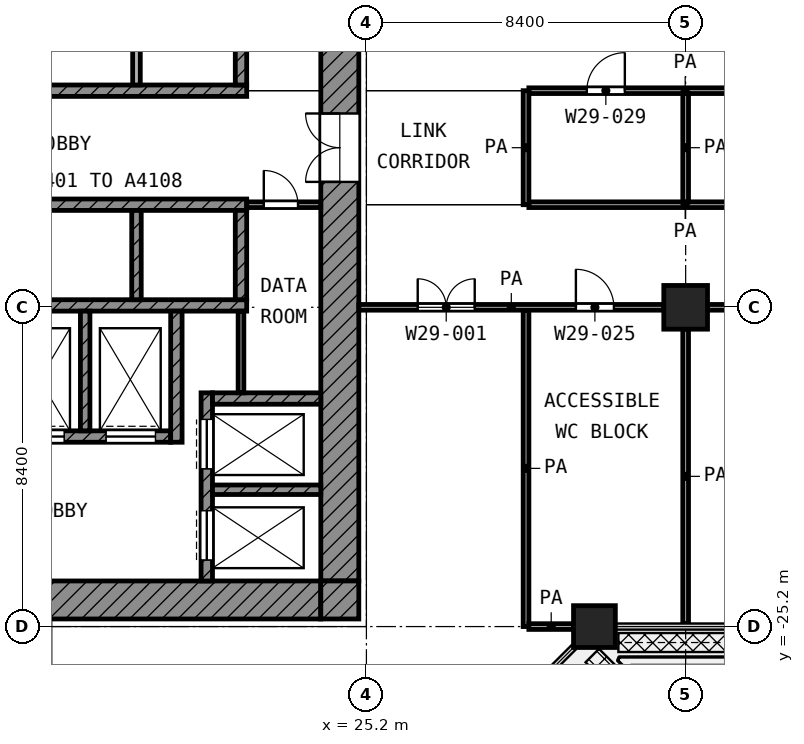
"""IFC4 building model, lengths in metres.
Left out: names, types, materials, properties, quantities, classifications, styles, units other than length and angle.
Written with IfcOpenShell. Run it as: python <this file> out.ifc"""

import sys

from ifc_helpers import new_model, si_unit, direction, frame, frame_2d, origin, origin_2d, place, context, subcontext, project, spatial, rectangle, extrude, element, fill, save


model = new_model("IFC4")
c1 = context("Model", 3, precision=1e-05, world=origin(), true_north=direction((0.0, 1.0)))
c2 = subcontext(c1, "Body", "Model", "MODEL_VIEW")
j1 = project(units=[si_unit("LENGTHUNIT", "METRE"), si_unit("PLANEANGLEUNIT", "RADIAN")], contexts=[c1])
p1 = place(None, origin())
s1 = spatial("IfcSite", under=j1, at=p1, CompositionType="ELEMENT")
p2 = place(p1, origin())
s2 = spatial("IfcBuilding", under=s1, at=p2, CompositionType="ELEMENT")
p3 = place(p2, frame((0.0, 0.0, 149.2)))
s3 = spatial("IfcBuildingStorey", under=s2, at=p3, CompositionType="ELEMENT", Elevation=149.2)
p4 = place(p3, frame((33.6, -16.8, 0.0), z_axis=(0.0, 0.0, 1.0), x_axis=(1.0, 0.0, 0.0)))
e1 = element("IfcColumn", 1, at=p4, inside=s3, PredefinedType="COLUMN", context=c2, shape_type="SweptSolid", body=[
    extrude(rectangle(XDim=1.15, YDim=1.15, at=origin_2d()), origin(), (0.0, 0.0, 1.0), 4.2),
])
p5 = place(p3, frame((31.2, -25.2, 0.0), z_axis=(0.0, 0.0, 1.0), x_axis=(1.0, 0.0, 0.0)))
e2 = element("IfcColumn", 2, at=p5, inside=s3, PredefinedType="COLUMN", context=c2, shape_type="SweptSolid", body=[
    extrude(rectangle(XDim=1.1, YDim=1.1, at=origin_2d()), origin(), (0.0, 0.0, 1.0), 4.2),
])
p6 = place(p3, frame((24.5, -24.0, 0.0), z_axis=(0.0, 0.0, 1.0), x_axis=(0.0, 1.0, 0.0)))
e3 = element("IfcWall", 3, at=p6, inside=s3, PredefinedType="SHEAR", context=c2, shape_type="SweptSolid", body=[
    extrude(rectangle(XDim=18.6, YDim=1.0, at=frame_2d((9.3, 0.0))), origin(), (0.0, 0.0, 1.0), 3.7),
])
p7 = place(p6, frame((10.5, 0.0, 0.0)))
e4 = element("IfcOpeningElement", 4, at=p7, cuts=e3, PredefinedType="OPENING", context=c2, shape_type="SweptSolid", body=[
    extrude(rectangle(XDim=1.8, YDim=2.1, at=frame_2d((0.9, 1.05))), frame((0.0, 0.51, 0.0), z_axis=(0.0, -1.0, 0.0), x_axis=(1.0, 0.0, 0.0)), (0.0, 0.0, 1.0), 1.02),
])
p8 = place(p3, frame((5.4, -24.5, 0.0), z_axis=(0.0, 0.0, 1.0), x_axis=(1.0, 0.0, 0.0)))
e5 = element("IfcWall", 5, at=p8, inside=s3, PredefinedType="SHEAR", context=c2, shape_type="SweptSolid", body=[
    extrude(rectangle(XDim=18.6, YDim=1.0, at=frame_2d((9.3, 0.0))), origin(), (0.0, 0.0, 1.0), 3.7),
])
p9 = place(p8, frame((6.3, 0.0, 0.0)))
e6 = element("IfcOpeningElement", 6, at=p9, cuts=e5, PredefinedType="OPENING", context=c2, shape_type="SweptSolid", body=[
    extrude(rectangle(XDim=1.8, YDim=2.1, at=frame_2d((0.9, 1.05))), frame((0.0, 0.51, 0.0), z_axis=(0.0, -1.0, 0.0), x_axis=(1.0, 0.0, 0.0)), (0.0, 0.0, 1.0), 1.02),
])
p10 = place(p3, frame((24.5, -25.0, 0.0), z_axis=(0.0, 0.0, 1.0), x_axis=(0.0, 1.0, 0.0)))
e7 = element("IfcWall", 7, at=p10, inside=s3, PredefinedType="SHEAR", context=c2, shape_type="SweptSolid", body=[
    extrude(rectangle(XDim=1.0, YDim=1.0, at=frame_2d((0.5, 0.0))), origin(), (0.0, 0.0, 1.0), 3.7),
])
p11 = place(p3, frame((5.4, -11.1, 0.0), z_axis=(0.0, 0.0, 1.0), x_axis=(1.0, 0.0, 0.0)))
e8 = element("IfcWall", 8, at=p11, inside=s3, PredefinedType="SHEAR", context=c2, shape_type="SweptSolid", body=[
    extrude(rectangle(XDim=16.65, YDim=0.3, at=frame_2d((8.325, 0.0))), origin(), (0.0, 0.0, 1.0), 3.7),
])
p12 = place(p11, frame((0.825, 0.0, 0.0)))
e9 = element("IfcOpeningElement", 9, at=p12, cuts=e8, PredefinedType="OPENING", context=c2, shape_type="SweptSolid", body=[
    extrude(rectangle(XDim=1.1, YDim=2.1, at=frame_2d((0.55, 1.05))), frame((0.0, 0.16, 0.0), z_axis=(0.0, -1.0, 0.0), x_axis=(1.0, 0.0, 0.0)), (0.0, 0.0, 1.0), 0.32),
])
p13 = place(p11, frame((3.575, 0.0, 0.0)))
e10 = element("IfcOpeningElement", 10, at=p13, cuts=e8, PredefinedType="OPENING", context=c2, shape_type="SweptSolid", body=[
    extrude(rectangle(XDim=1.1, YDim=2.1, at=frame_2d((0.55, 1.05))), frame((0.0, 0.16, 0.0), z_axis=(0.0, -1.0, 0.0), x_axis=(1.0, 0.0, 0.0)), (0.0, 0.0, 1.0), 0.32),
])
p14 = place(p11, frame((6.325, 0.0, 0.0)))
e11 = element("IfcOpeningElement", 11, at=p14, cuts=e8, PredefinedType="OPENING", context=c2, shape_type="SweptSolid", body=[
    extrude(rectangle(XDim=1.1, YDim=2.1, at=frame_2d((0.55, 1.05))), frame((0.0, 0.16, 0.0), z_axis=(0.0, -1.0, 0.0), x_axis=(1.0, 0.0, 0.0)), (0.0, 0.0, 1.0), 0.32),
])
p15 = place(p11, frame((9.075, 0.0, 0.0)))
e12 = element("IfcOpeningElement", 12, at=p15, cuts=e8, PredefinedType="OPENING", context=c2, shape_type="SweptSolid", body=[
    extrude(rectangle(XDim=1.1, YDim=2.1, at=frame_2d((0.55, 1.05))), frame((0.0, 0.16, 0.0), z_axis=(0.0, -1.0, 0.0), x_axis=(1.0, 0.0, 0.0)), (0.0, 0.0, 1.0), 0.32),
])
for number, where, z_axis, x_axis in (
    (13, (5.4, -14.1, 0.0), (0.0, 0.0, 1.0), (1.0, 0.0, 0.0)),
    (14, (5.4, -16.75, 0.0), (0.0, 0.0, 1.0), (1.0, 0.0, 0.0)),
):
    element("IfcWall", number, at=place(p3, frame(where, z_axis=z_axis, x_axis=x_axis)), inside=s3, PredefinedType="SHEAR", context=c2, shape_type="SweptSolid", body=[
        extrude(rectangle(XDim=16.65, YDim=0.3, at=frame_2d((8.325, 0.0))), origin(), (0.0, 0.0, 1.0), 3.7),
    ])
p16 = place(p3, frame((5.4, -20.2, 0.0), z_axis=(0.0, 0.0, 1.0), x_axis=(1.0, 0.0, 0.0)))
e15 = element("IfcWall", 15, at=p16, inside=s3, PredefinedType="SHEAR", context=c2, shape_type="SweptSolid", body=[
    extrude(rectangle(XDim=14.65, YDim=0.3, at=frame_2d((7.325, 0.0))), origin(), (0.0, 0.0, 1.0), 3.7),
])
p17 = place(p16, frame((10.55, 0.0, 0.0)))
e16 = element("IfcOpeningElement", 16, at=p17, cuts=e15, PredefinedType="OPENING", context=c2, shape_type="SweptSolid", body=[
    extrude(rectangle(XDim=1.3, YDim=2.1, at=frame_2d((0.65, 1.05))), frame((0.0, 0.16, 0.0), z_axis=(0.0, -1.0, 0.0), x_axis=(1.0, 0.0, 0.0)), (0.0, 0.0, 1.0), 0.32),
])
p18 = place(p16, frame((12.95, 0.0, 0.0)))
e17 = element("IfcOpeningElement", 17, at=p18, cuts=e15, PredefinedType="OPENING", context=c2, shape_type="SweptSolid", body=[
    extrude(rectangle(XDim=1.3, YDim=2.1, at=frame_2d((0.65, 1.05))), frame((0.0, 0.16, 0.0), z_axis=(0.0, -1.0, 0.0), x_axis=(1.0, 0.0, 0.0)), (0.0, 0.0, 1.0), 0.32),
])
p19 = place(p16, frame((0.55, 0.0, 0.0)))
e18 = element("IfcOpeningElement", 18, at=p19, cuts=e15, PredefinedType="OPENING", context=c2, shape_type="SweptSolid", body=[
    extrude(rectangle(XDim=1.3, YDim=2.1, at=frame_2d((0.65, 1.05))), frame((0.0, 0.16, 0.0), z_axis=(0.0, -1.0, 0.0), x_axis=(1.0, 0.0, 0.0)), (0.0, 0.0, 1.0), 0.32),
])
p20 = place(p16, frame((2.95, 0.0, 0.0)))
e19 = element("IfcOpeningElement", 19, at=p20, cuts=e15, PredefinedType="OPENING", context=c2, shape_type="SweptSolid", body=[
    extrude(rectangle(XDim=1.3, YDim=2.1, at=frame_2d((0.65, 1.05))), frame((0.0, 0.16, 0.0), z_axis=(0.0, -1.0, 0.0), x_axis=(1.0, 0.0, 0.0)), (0.0, 0.0, 1.0), 0.32),
])
p21 = place(p16, frame((5.35, 0.0, 0.0)))
e20 = element("IfcOpeningElement", 20, at=p21, cuts=e15, PredefinedType="OPENING", context=c2, shape_type="SweptSolid", body=[
    extrude(rectangle(XDim=0.9, YDim=2.1, at=frame_2d((0.45, 1.05))), frame((0.0, 0.16, 0.0), z_axis=(0.0, -1.0, 0.0), x_axis=(1.0, 0.0, 0.0)), (0.0, 0.0, 1.0), 0.32),
])
p22 = place(p16, frame((7.75, 0.0, 0.0)))
e21 = element("IfcOpeningElement", 21, at=p22, cuts=e15, PredefinedType="OPENING", context=c2, shape_type="SweptSolid", body=[
    extrude(rectangle(XDim=0.9, YDim=2.1, at=frame_2d((0.45, 1.05))), frame((0.0, 0.16, 0.0), z_axis=(0.0, -1.0, 0.0), x_axis=(1.0, 0.0, 0.0)), (0.0, 0.0, 1.0), 0.32),
])
p23 = place(p3, frame((20.2, -20.35, 0.0), z_axis=(0.0, 0.0, 1.0), x_axis=(0.0, 1.0, 0.0)))
e22 = element("IfcWall", 22, at=p23, inside=s3, PredefinedType="SHEAR", context=c2, shape_type="SweptSolid", body=[
    extrude(rectangle(XDim=3.45, YDim=0.3, at=frame_2d((1.725, 0.0))), origin(), (0.0, 0.0, 1.0), 3.7),
])
p24 = place(p3, frame((21.9, -10.95, 0.0), z_axis=(0.0, 0.0, 1.0), x_axis=(0.0, 1.0, 0.0)))
e23 = element("IfcWall", 23, at=p24, inside=s3, PredefinedType="SHEAR", context=c2, shape_type="SweptSolid", body=[
    extrude(rectangle(XDim=2.35, YDim=0.3, at=frame_2d((1.175, 0.0))), origin(), (0.0, 0.0, 1.0), 3.7),
])
p25 = place(p3, frame((21.9, -16.6, 0.0), z_axis=(0.0, 0.0, 1.0), x_axis=(0.0, 1.0, 0.0)))
e24 = element("IfcWall", 24, at=p25, inside=s3, PredefinedType="SHEAR", context=c2, shape_type="SweptSolid", body=[
    extrude(rectangle(XDim=2.35, YDim=0.3, at=frame_2d((1.175, 0.0))), origin(), (0.0, 0.0, 1.0), 3.7),
])
p26 = place(p3, frame((21.15, -19.2, 0.0), z_axis=(0.0, 0.0, 1.0), x_axis=(1.0, 0.0, 0.0)))
e25 = element("IfcWall", 25, at=p26, inside=s3, PredefinedType="SHEAR", context=c2, shape_type="SweptSolid", body=[
    extrude(rectangle(XDim=2.85, YDim=0.3, at=frame_2d((1.425, 0.0))), origin(), (0.0, 0.0, 1.0), 3.7),
])
p27 = place(p3, frame((21.0, -24.0, 0.0), z_axis=(0.0, 0.0, 1.0), x_axis=(0.0, 1.0, 0.0)))
e26 = element("IfcWall", 26, at=p27, inside=s3, PredefinedType="SHEAR", context=c2, shape_type="SweptSolid", body=[
    extrude(rectangle(XDim=4.95, YDim=0.3, at=frame_2d((2.475, 0.0))), origin(), (0.0, 0.0, 1.0), 3.7),
])
p28 = place(p27, frame((2.95, 0.0, 0.0)))
e27 = element("IfcOpeningElement", 27, at=p28, cuts=e26, PredefinedType="OPENING", context=c2, shape_type="SweptSolid", body=[
    extrude(rectangle(XDim=1.3, YDim=2.1, at=frame_2d((0.65, 1.05))), frame((0.0, 0.16, 0.0), z_axis=(0.0, -1.0, 0.0), x_axis=(1.0, 0.0, 0.0)), (0.0, 0.0, 1.0), 0.32),
])
p29 = place(p27, frame((0.55, 0.0, 0.0)))
e28 = element("IfcOpeningElement", 28, at=p29, cuts=e26, PredefinedType="OPENING", context=c2, shape_type="SweptSolid", body=[
    extrude(rectangle(XDim=1.3, YDim=2.1, at=frame_2d((0.65, 1.05))), frame((0.0, 0.16, 0.0), z_axis=(0.0, -1.0, 0.0), x_axis=(1.0, 0.0, 0.0)), (0.0, 0.0, 1.0), 0.32),
])
p30 = place(p3, frame((21.15, -21.6, 0.0), z_axis=(0.0, 0.0, 1.0), x_axis=(1.0, 0.0, 0.0)))
e29 = element("IfcWall", 29, at=p30, inside=s3, PredefinedType="SHEAR", context=c2, shape_type="SweptSolid", body=[
    extrude(rectangle(XDim=2.85, YDim=0.25, at=frame_2d((1.425, 0.0))), origin(), (0.0, 0.0, 1.0), 3.7),
])
p31 = place(p3, frame((17.8, -20.05, 0.0), z_axis=(0.0, 0.0, 1.0), x_axis=(0.0, 1.0, 0.0)))
e30 = element("IfcWall", 30, at=p31, inside=s3, PredefinedType="SHEAR", context=c2, shape_type="SweptSolid", body=[
    extrude(rectangle(XDim=3.15, YDim=0.25, at=frame_2d((1.575, 0.0))), origin(), (0.0, 0.0, 1.0), 3.7),
])
p32 = place(p3, frame((19.15, -10.95, 0.0), z_axis=(0.0, 0.0, 1.0), x_axis=(0.0, 1.0, 0.0)))
e31 = element("IfcWall", 31, at=p32, inside=s3, PredefinedType="PARTITIONING", context=c2, shape_type="SweptSolid", body=[
    extrude(rectangle(XDim=2.35, YDim=0.2, at=frame_2d((1.175, 0.0))), origin(), (0.0, 0.0, 1.0), 3.7),
])
p33 = place(p3, frame((19.15, -16.6, 0.0), z_axis=(0.0, 0.0, 1.0), x_axis=(0.0, 1.0, 0.0)))
e32 = element("IfcWall", 32, at=p33, inside=s3, PredefinedType="SHEAR", context=c2, shape_type="SweptSolid", body=[
    extrude(rectangle(XDim=2.35, YDim=0.25, at=frame_2d((1.175, 0.0))), origin(), (0.0, 0.0, 1.0), 3.7),
])
p34 = place(p3, frame((21.9, -19.05, 0.0), z_axis=(0.0, 0.0, 1.0), x_axis=(0.0, 1.0, 0.0)))
e33 = element("IfcWall", 33, at=p34, inside=s3, PredefinedType="PARTITIONING", context=c2, shape_type="SweptSolid", body=[
    extrude(rectangle(XDim=2.15, YDim=0.15, at=frame_2d((1.075, 0.0))), origin(), (0.0, 0.0, 1.0), 3.7),
])
p35 = place(p3, frame((22.05, -14.1, 0.0), z_axis=(0.0, 0.0, 1.0), x_axis=(1.0, 0.0, 0.0)))
e34 = element("IfcWall", 34, at=p35, inside=s3, PredefinedType="PARTITIONING", context=c2, shape_type="SweptSolid", body=[
    extrude(rectangle(XDim=1.95, YDim=0.15, at=frame_2d((0.975, 0.0))), origin(), (0.0, 0.0, 1.0), 3.7),
])
p36 = place(p35, frame((0.45, 0.0, 0.0)))
e35 = element("IfcOpeningElement", 35, at=p36, cuts=e34, PredefinedType="OPENING", context=c2, shape_type="SweptSolid", body=[
    extrude(rectangle(XDim=0.9, YDim=2.1, at=frame_2d((0.45, 1.05))), frame((0.0, 0.085, 0.0), z_axis=(0.0, -1.0, 0.0), x_axis=(1.0, 0.0, 0.0)), (0.0, 0.0, 1.0), 0.17),
])
p37 = place(p3, frame((29.475, -25.2, 0.0), z_axis=(0.0, 0.0, 1.0), x_axis=(1.0, 0.0, 0.0)))
e36 = element("IfcWall", 36, at=p37, inside=s3, PredefinedType="PARTITIONING", context=c2, shape_type="SweptSolid", body=[
    extrude(rectangle(XDim=1.175, YDim=0.15, at=frame_2d((0.587, 0.0))), origin(), (0.0, 0.0, 1.0), 3.7),
])
p38 = place(p3, frame((25.0, -16.8, 0.0), z_axis=(0.0, 0.0, 1.0), x_axis=(1.0, 0.0, 0.0)))
e37 = element("IfcWall", 37, at=p38, inside=s3, PredefinedType="PARTITIONING", context=c2, shape_type="SweptSolid", body=[
    extrude(rectangle(XDim=8.025, YDim=0.15, at=frame_2d((4.012, 0.0))), origin(), (0.0, 0.0, 1.0), 3.7),
])
p39 = place(p38, frame((1.55, 0.0, 0.0)))
e38 = element("IfcOpeningElement", 38, at=p39, cuts=e37, PredefinedType="OPENING", context=c2, shape_type="SweptSolid", body=[
    extrude(rectangle(XDim=1.5, YDim=2.1, at=frame_2d((0.75, 1.05))), frame((0.0, 0.085, 0.0), z_axis=(0.0, -1.0, 0.0), x_axis=(1.0, 0.0, 0.0)), (0.0, 0.0, 1.0), 0.17),
])
p40 = place(p38, frame((5.712, 0.0, 0.0)))
e39 = element("IfcOpeningElement", 39, at=p40, cuts=e37, PredefinedType="OPENING", context=c2, shape_type="SweptSolid", body=[
    extrude(rectangle(XDim=1.0, YDim=2.1, at=frame_2d((0.5, 1.05))), frame((0.0, 0.085, 0.0), z_axis=(0.0, -1.0, 0.0), x_axis=(1.0, 0.0, 0.0)), (0.0, 0.0, 1.0), 0.17),
])
p41 = place(p3, frame((34.175, -16.8, 0.0), z_axis=(0.0, 0.0, 1.0), x_axis=(1.0, 0.0, 0.0)))
e40 = element("IfcWall", 40, at=p41, inside=s3, PredefinedType="PARTITIONING", context=c2, shape_type="SweptSolid", body=[
    extrude(rectangle(XDim=41.345, YDim=0.15, at=frame_2d((20.672, 0.0))), origin(), (0.0, 0.0, 1.0), 3.7),
])
p42 = place(p41, frame((3.312, 0.0, 0.0)))
e41 = element("IfcOpeningElement", 41, at=p42, cuts=e40, PredefinedType="OPENING", context=c2, shape_type="SweptSolid", body=[
    extrude(rectangle(XDim=1.2, YDim=2.1, at=frame_2d((0.6, 1.05))), frame((0.0, 0.085, 0.0), z_axis=(0.0, -1.0, 0.0), x_axis=(1.0, 0.0, 0.0)), (0.0, 0.0, 1.0), 0.17),
])
p43 = place(p41, frame((8.825, 0.0, 0.0)))
e42 = element("IfcOpeningElement", 42, at=p43, cuts=e40, PredefinedType="OPENING", context=c2, shape_type="SweptSolid", body=[
    extrude(rectangle(XDim=1.2, YDim=2.1, at=frame_2d((0.6, 1.05))), frame((0.0, 0.085, 0.0), z_axis=(0.0, -1.0, 0.0), x_axis=(1.0, 0.0, 0.0)), (0.0, 0.0, 1.0), 0.17),
])
p44 = place(p41, frame((17.725, 0.0, 0.0)))
e43 = element("IfcOpeningElement", 43, at=p44, cuts=e40, PredefinedType="OPENING", context=c2, shape_type="SweptSolid", body=[
    extrude(rectangle(XDim=1.5, YDim=2.1, at=frame_2d((0.75, 1.05))), frame((0.0, 0.085, 0.0), z_axis=(0.0, -1.0, 0.0), x_axis=(1.0, 0.0, 0.0)), (0.0, 0.0, 1.0), 0.17),
])
p45 = place(p41, frame((25.325, 0.0, 0.0)))
e44 = element("IfcOpeningElement", 44, at=p45, cuts=e40, PredefinedType="OPENING", context=c2, shape_type="SweptSolid", body=[
    extrude(rectangle(XDim=1.2, YDim=2.1, at=frame_2d((0.6, 1.05))), frame((0.0, 0.085, 0.0), z_axis=(0.0, -1.0, 0.0), x_axis=(1.0, 0.0, 0.0)), (0.0, 0.0, 1.0), 0.17),
])
p46 = place(p41, frame((31.225, 0.0, 0.0)))
e45 = element("IfcOpeningElement", 45, at=p46, cuts=e40, PredefinedType="OPENING", context=c2, shape_type="SweptSolid", body=[
    extrude(rectangle(XDim=1.2, YDim=2.1, at=frame_2d((0.6, 1.05))), frame((0.0, 0.085, 0.0), z_axis=(0.0, -1.0, 0.0), x_axis=(1.0, 0.0, 0.0)), (0.0, 0.0, 1.0), 0.17),
])
p47 = place(p41, frame((36.475, 0.0, 0.0)))
e46 = element("IfcOpeningElement", 46, at=p47, cuts=e40, PredefinedType="OPENING", context=c2, shape_type="SweptSolid", body=[
    extrude(rectangle(XDim=1.5, YDim=2.1, at=frame_2d((0.75, 1.05))), frame((0.0, 0.085, 0.0), z_axis=(0.0, -1.0, 0.0), x_axis=(1.0, 0.0, 0.0)), (0.0, 0.0, 1.0), 0.17),
])
p48 = place(p3, frame((29.475, -14.1, 0.0), z_axis=(0.0, 0.0, 1.0), x_axis=(1.0, 0.0, 0.0)))
e47 = element("IfcWall", 47, at=p48, inside=s3, PredefinedType="PARTITIONING", context=c2, shape_type="SweptSolid", body=[
    extrude(rectangle(XDim=8.225, YDim=0.15, at=frame_2d((4.112, 0.0))), origin(), (0.0, 0.0, 1.0), 3.7),
])
p49 = place(p48, frame((5.725, 0.0, 0.0)))
e48 = element("IfcOpeningElement", 48, at=p49, cuts=e47, PredefinedType="OPENING", context=c2, shape_type="SweptSolid", body=[
    extrude(rectangle(XDim=1.0, YDim=2.1, at=frame_2d((0.5, 1.05))), frame((0.0, 0.085, 0.0), z_axis=(0.0, -1.0, 0.0), x_axis=(1.0, 0.0, 0.0)), (0.0, 0.0, 1.0), 0.17),
])
p50 = place(p3, frame((29.475, -11.1, 0.0), z_axis=(0.0, 0.0, 1.0), x_axis=(1.0, 0.0, 0.0)))
e49 = element("IfcWall", 49, at=p50, inside=s3, PredefinedType="PARTITIONING", context=c2, shape_type="SweptSolid", body=[
    extrude(rectangle(XDim=8.225, YDim=0.15, at=frame_2d((4.112, 0.0))), origin(), (0.0, 0.0, 1.0), 3.7),
])
p51 = place(p50, frame((1.525, 0.0, 0.0)))
e50 = element("IfcOpeningElement", 50, at=p51, cuts=e49, PredefinedType="OPENING", context=c2, shape_type="SweptSolid", body=[
    extrude(rectangle(XDim=1.0, YDim=2.1, at=frame_2d((0.5, 1.05))), frame((0.0, 0.085, 0.0), z_axis=(0.0, -1.0, 0.0), x_axis=(1.0, 0.0, 0.0)), (0.0, 0.0, 1.0), 0.17),
])
p52 = place(p3, frame((29.4, -25.2, 0.0), z_axis=(0.0, 0.0, 1.0), x_axis=(0.0, 1.0, 0.0)))
e51 = element("IfcWall", 51, at=p52, inside=s3, PredefinedType="PARTITIONING", context=c2, shape_type="SweptSolid", body=[
    extrude(rectangle(XDim=8.325, YDim=0.15, at=frame_2d((4.163, 0.0))), origin(), (0.0, 0.0, 1.0), 3.7),
])
p53 = place(p3, frame((29.4, -14.1, 0.0), z_axis=(0.0, 0.0, 1.0), x_axis=(0.0, 1.0, 0.0)))
e52 = element("IfcWall", 52, at=p53, inside=s3, PredefinedType="PARTITIONING", context=c2, shape_type="SweptSolid", body=[
    extrude(rectangle(XDim=3.0, YDim=0.15, at=frame_2d((1.5, 0.0))), origin(), (0.0, 0.0, 1.0), 3.7),
])
p54 = place(p3, frame((33.6, -25.12, 0.0), z_axis=(0.0, 0.0, 1.0), x_axis=(0.0, 1.0, 0.0)))
e53 = element("IfcWall", 53, at=p54, inside=s3, PredefinedType="PARTITIONING", context=c2, shape_type="SweptSolid", body=[
    extrude(rectangle(XDim=7.745, YDim=0.15, at=frame_2d((3.873, 0.0))), origin(), (0.0, 0.0, 1.0), 3.7),
])
p55 = place(p3, frame((33.6, -14.025, 0.0), z_axis=(0.0, 0.0, 1.0), x_axis=(0.0, 1.0, 0.0)))
e54 = element("IfcWall", 54, at=p55, inside=s3, PredefinedType="PARTITIONING", context=c2, shape_type="SweptSolid", body=[
    extrude(rectangle(XDim=2.85, YDim=0.15, at=frame_2d((1.425, 0.0))), origin(), (0.0, 0.0, 1.0), 3.7),
])
p56 = place(p28, origin())
e55 = element("IfcDoor", 55, at=p56, inside=s3, OperationType="DOUBLE_DOOR_SLIDING", PredefinedType="DOOR", context=c2, shape_type="SweptSolid", body=[
    extrude(rectangle(XDim=1.3, YDim=2.1, at=frame_2d((0.65, 1.05))), frame((0.0, 0.025, 0.0), z_axis=(0.0, -1.0, 0.0), x_axis=(1.0, 0.0, 0.0)), (0.0, 0.0, 1.0), 0.05),
])
fill(e27, e55)
p57 = place(p29, origin())
e56 = element("IfcDoor", 56, at=p57, inside=s3, OperationType="DOUBLE_DOOR_SLIDING", PredefinedType="DOOR", context=c2, shape_type="SweptSolid", body=[
    extrude(rectangle(XDim=1.3, YDim=2.1, at=frame_2d((0.65, 1.05))), frame((0.0, 0.025, 0.0), z_axis=(0.0, -1.0, 0.0), x_axis=(1.0, 0.0, 0.0)), (0.0, 0.0, 1.0), 0.05),
])
fill(e28, e56)
p58 = place(p17, origin())
e57 = element("IfcDoor", 57, at=p58, inside=s3, OperationType="DOUBLE_DOOR_SLIDING", PredefinedType="DOOR", context=c2, shape_type="SweptSolid", body=[
    extrude(rectangle(XDim=1.3, YDim=2.1, at=frame_2d((0.65, 1.05))), frame((0.0, 0.025, 0.0), z_axis=(0.0, -1.0, 0.0), x_axis=(1.0, 0.0, 0.0)), (0.0, 0.0, 1.0), 0.05),
])
fill(e16, e57)
p59 = place(p18, origin())
e58 = element("IfcDoor", 58, at=p59, inside=s3, OperationType="DOUBLE_DOOR_SLIDING", PredefinedType="DOOR", context=c2, shape_type="SweptSolid", body=[
    extrude(rectangle(XDim=1.3, YDim=2.1, at=frame_2d((0.65, 1.05))), frame((0.0, 0.025, 0.0), z_axis=(0.0, -1.0, 0.0), x_axis=(1.0, 0.0, 0.0)), (0.0, 0.0, 1.0), 0.05),
])
fill(e17, e58)
p60 = place(p7, origin())
e59 = element("IfcDoor", 59, at=p60, inside=s3, OperationType="DOUBLE_DOOR_SINGLE_SWING", PredefinedType="DOOR", context=c2, shape_type="SweptSolid", body=[
    extrude(rectangle(XDim=1.8, YDim=2.1, at=frame_2d((0.9, 1.05))), frame((0.0, 0.025, 0.0), z_axis=(0.0, -1.0, 0.0), x_axis=(1.0, 0.0, 0.0)), (0.0, 0.0, 1.0), 0.05),
])
fill(e4, e59)
p61 = place(p36, origin())
e60 = element("IfcDoor", 60, at=p61, inside=s3, OperationType="SINGLE_SWING_LEFT", PredefinedType="DOOR", context=c2, shape_type="SweptSolid", body=[
    extrude(rectangle(XDim=0.9, YDim=2.1, at=frame_2d((0.45, 1.05))), frame((0.0, 0.025, 0.0), z_axis=(0.0, -1.0, 0.0), x_axis=(1.0, 0.0, 0.0)), (0.0, 0.0, 1.0), 0.05),
])
fill(e35, e60)
p62 = place(p39, origin())
e61 = element("IfcDoor", 61, at=p62, inside=s3, OperationType="DOUBLE_DOOR_SINGLE_SWING", PredefinedType="DOOR", context=c2, shape_type="SweptSolid", body=[
    extrude(rectangle(XDim=1.5, YDim=2.1, at=frame_2d((0.75, 1.05))), frame((0.0, 0.025, 0.0), z_axis=(0.0, -1.0, 0.0), x_axis=(1.0, 0.0, 0.0)), (0.0, 0.0, 1.0), 0.05),
])
fill(e38, e61)
p63 = place(p51, origin())
e62 = element("IfcDoor", 62, at=p63, inside=s3, OperationType="SINGLE_SWING_RIGHT", PredefinedType="DOOR", context=c2, shape_type="SweptSolid", body=[
    extrude(rectangle(XDim=1.0, YDim=2.1, at=frame_2d((0.5, 1.05))), frame((0.0, 0.025, 0.0), z_axis=(0.0, -1.0, 0.0), x_axis=(1.0, 0.0, 0.0)), (0.0, 0.0, 1.0), 0.05),
])
fill(e50, e62)
p64 = place(p40, origin())
e63 = element("IfcDoor", 63, at=p64, inside=s3, OperationType="SINGLE_SWING_LEFT", PredefinedType="DOOR", context=c2, shape_type="SweptSolid", body=[
    extrude(rectangle(XDim=1.0, YDim=2.1, at=frame_2d((0.5, 1.05))), frame((0.0, 0.025, 0.0), z_axis=(0.0, -1.0, 0.0), x_axis=(1.0, 0.0, 0.0)), (0.0, 0.0, 1.0), 0.05),
])
fill(e39, e63)
save(model, sys.argv[1])
